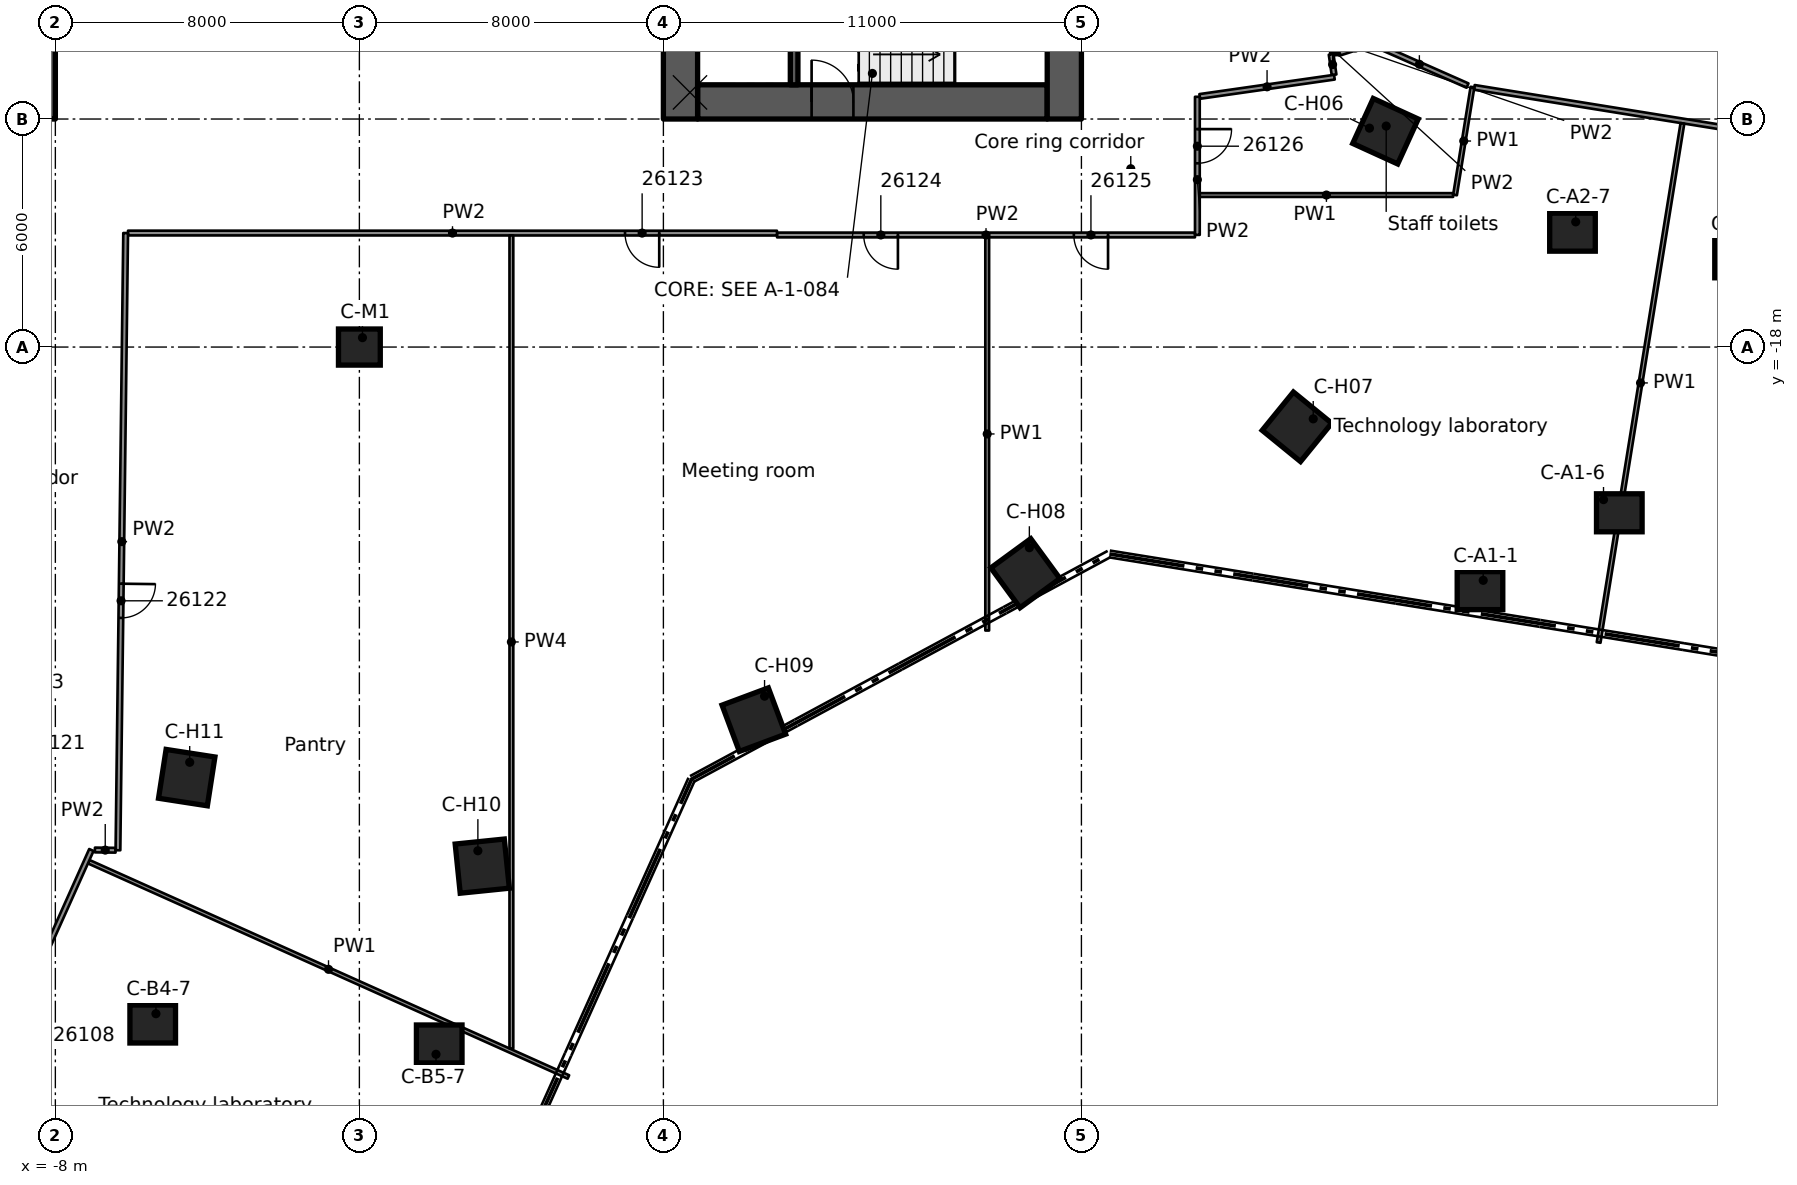
"""IFC4 building model, lengths in metres.
Left out: names, types, materials, properties, quantities, classifications, styles, units other than length and angle.
Written with IfcOpenShell. Run it as: python <this file> out.ifc"""

import sys

from ifc_helpers import new_model, si_unit, direction, frame, frame_2d, origin, origin_2d, place, context, subcontext, project, spatial, rectangle, extrude, element, fill, save


model = new_model("IFC4")
c1 = context("Model", 3, precision=1e-05, world=origin(), true_north=direction((0.0, 1.0)))
c2 = subcontext(c1, "Body", "Model", "MODEL_VIEW")
j1 = project(units=[si_unit("LENGTHUNIT", "METRE"), si_unit("PLANEANGLEUNIT", "RADIAN")], contexts=[c1])
p1 = place(None, origin())
s1 = spatial("IfcSite", under=j1, at=p1, CompositionType="ELEMENT")
p2 = place(p1, origin())
s2 = spatial("IfcBuilding", under=s1, at=p2, CompositionType="ELEMENT")
p3 = place(p2, frame((0.0, 0.0, 134.2)))
s3 = spatial("IfcBuildingStorey", under=s2, at=p3, CompositionType="ELEMENT", Elevation=134.2)
p4 = place(p3, frame((-8.45, -12.0, 0.0), z_axis=(0.0, 0.0, 1.0), x_axis=(0.0, 1.0, 0.0)))
e1 = element("IfcWall", 1, at=p4, inside=s3, PredefinedType="SHEAR", context=c2, shape_type="SweptSolid", body=[
    extrude(rectangle(XDim=24.0, YDim=0.9, at=frame_2d((12.0, 0.0))), origin(), (0.0, 0.0, 1.0), 3.5),
])
p5 = place(p4, frame((9.6, 0.0, 0.0)))
e2 = element("IfcOpeningElement", 2, at=p5, cuts=e1, PredefinedType="OPENING", context=c2, shape_type="SweptSolid", body=[
    extrude(rectangle(XDim=1.8, YDim=2.1, at=frame_2d((0.9, 1.05))), frame((0.0, 0.46, 0.0), z_axis=(0.0, -1.0, 0.0), x_axis=(1.0, 0.0, 0.0)), (0.0, 0.0, 1.0), 0.92),
])
p6 = place(p4, frame((19.65, 0.0, 0.0)))
e3 = element("IfcOpeningElement", 3, at=p6, cuts=e1, PredefinedType="OPENING", context=c2, shape_type="SweptSolid", body=[
    extrude(rectangle(XDim=1.1, YDim=2.1, at=frame_2d((0.55, 1.05))), frame((0.0, 0.46, 0.0), z_axis=(0.0, -1.0, 0.0), x_axis=(1.0, 0.0, 0.0)), (0.0, 0.0, 1.0), 0.92),
])
p7 = place(p3, frame((8.9, -11.55, 0.0), z_axis=(0.0, 0.0, 1.0), x_axis=(1.0, 0.0, 0.0)))
e4 = element("IfcWall", 4, at=p7, inside=s3, PredefinedType="SHEAR", context=c2, shape_type="SweptSolid", body=[
    extrude(rectangle(XDim=9.2, YDim=0.9, at=frame_2d((4.6, 0.0))), origin(), (0.0, 0.0, 1.0), 3.5),
])
p8 = place(p7, frame((3.0, 0.0, 0.0)))
e5 = element("IfcOpeningElement", 5, at=p8, cuts=e4, PredefinedType="OPENING", context=c2, shape_type="SweptSolid", body=[
    extrude(rectangle(XDim=1.1, YDim=2.1, at=frame_2d((0.55, 1.05))), frame((0.0, 0.46, 0.0), z_axis=(0.0, -1.0, 0.0), x_axis=(1.0, 0.0, 0.0)), (0.0, 0.0, 1.0), 0.92),
])
p9 = place(p3, frame((8.45, -12.0, 0.0), z_axis=(0.0, 0.0, 1.0), x_axis=(0.0, 1.0, 0.0)))
e6 = element("IfcWall", 6, at=p9, inside=s3, PredefinedType="SHEAR", context=c2, shape_type="SweptSolid", body=[
    extrude(rectangle(XDim=24.0, YDim=0.9, at=frame_2d((12.0, 0.0))), origin(), (0.0, 0.0, 1.0), 3.5),
])
p10 = place(p9, frame((12.6, 0.0, 0.0)))
e7 = element("IfcOpeningElement", 7, at=p10, cuts=e6, PredefinedType="OPENING", context=c2, shape_type="SweptSolid", body=[
    extrude(rectangle(XDim=1.8, YDim=2.1, at=frame_2d((0.9, 1.05))), frame((0.0, 0.46, 0.0), z_axis=(0.0, -1.0, 0.0), x_axis=(1.0, 0.0, 0.0)), (0.0, 0.0, 1.0), 0.92),
])
p11 = place(p9, frame((3.25, 0.0, 0.0)))
e8 = element("IfcOpeningElement", 8, at=p11, cuts=e6, PredefinedType="OPENING", context=c2, shape_type="SweptSolid", body=[
    extrude(rectangle(XDim=1.1, YDim=2.1, at=frame_2d((0.55, 1.05))), frame((0.0, 0.46, 0.0), z_axis=(0.0, -1.0, 0.0), x_axis=(1.0, 0.0, 0.0)), (0.0, 0.0, 1.0), 0.92),
])
p12 = place(p3, frame((18.55, -12.0, 0.0), z_axis=(0.0, 0.0, 1.0), x_axis=(0.0, 1.0, 0.0)))
e9 = element("IfcWall", 9, at=p12, inside=s3, PredefinedType="SHEAR", context=c2, shape_type="SweptSolid", body=[
    extrude(rectangle(XDim=24.0, YDim=0.9, at=frame_2d((12.0, 0.0))), origin(), (0.0, 0.0, 1.0), 3.5),
])
p13 = place(p12, frame((12.1, 0.0, 0.0)))
e10 = element("IfcOpeningElement", 10, at=p13, cuts=e9, PredefinedType="OPENING", context=c2, shape_type="SweptSolid", body=[
    extrude(rectangle(XDim=1.8, YDim=2.1, at=frame_2d((0.9, 1.05))), frame((0.0, 0.46, 0.0), z_axis=(0.0, -1.0, 0.0), x_axis=(1.0, 0.0, 0.0)), (0.0, 0.0, 1.0), 0.92),
])
for number, where, z_axis, x_axis in (
    (11, (29.488, -24.409, 0.0), (0.0, 0.0, 1.0), (1.0, 0.0, 0.0)),
    (12, (33.154, -22.361, 0.0), (0.0, 0.0, 1.0), (1.0, 0.0, 0.0)),
    (13, (36.266, -15.678, 0.0), (0.0, 0.0, 1.0), (1.0, 0.0, 0.0)),
    (14, (31.922, -14.977, 0.0), (0.0, 0.0, 1.0), (1.0, 0.0, 0.0)),
    (15, (-5.438, -35.812, 0.0), (0.0, 0.0, 1.0), (1.0, 0.0, 0.0)),
    (16, (2.101, -36.338, 0.0), (0.0, 0.0, 1.0), (1.0, 0.0, 0.0)),
):
    element("IfcColumn", number, at=place(p3, frame(where, z_axis=z_axis, x_axis=x_axis)), inside=s3, PredefinedType="COLUMN", context=c2, shape_type="SweptSolid", body=[
        extrude(rectangle(XDim=1.2, YDim=1.0, at=origin_2d()), origin(), (0.0, 0.0, 1.0), 3.5),
    ])
for number, where, z_axis, x_axis in (
    (17, (27.001, -12.321, 0.0), (0.0, 0.0, 1.0), (0.91, -0.415, 0.0)),
    (18, (24.672, -20.098, 0.0), (0.0, 0.0, 1.0), (0.775, -0.632, 0.0)),
    (19, (17.526, -23.951, 0.0), (0.0, 0.0, 1.0), (0.591, -0.807, 0.0)),
    (20, (10.38, -27.804, 0.0), (0.0, 0.0, 1.0), (0.35, -0.937, 0.0)),
    (21, (3.234, -31.658, 0.0), (0.0, 0.0, 1.0), (0.102, -0.995, 0.0)),
    (22, (-4.543, -29.329, 0.0), (0.0, 0.0, 1.0), (-0.153, -0.988, 0.0)),
):
    element("IfcColumn", number, at=place(p3, frame(where, z_axis=z_axis, x_axis=x_axis)), inside=s3, PredefinedType="COLUMN", context=c2, shape_type="SweptSolid", body=[
        extrude(rectangle(XDim=1.3, YDim=1.3, at=origin_2d()), origin(), (0.0, 0.0, 1.0), 3.5),
    ])
p14 = place(p3, frame((0.0, -18.0, 0.0), z_axis=(0.0, 0.0, 1.0), x_axis=(1.0, 0.0, 0.0)))
e23 = element("IfcColumn", 23, at=p14, inside=s3, PredefinedType="COLUMN", context=c2, shape_type="SweptSolid", body=[
    extrude(rectangle(XDim=1.1, YDim=0.95, at=origin_2d()), origin(), (0.0, 0.0, 1.0), 3.5),
])
p15 = place(p3, frame((11.44, -6.975, 0.0), z_axis=(0.0, 0.0, 1.0), x_axis=(0.0, -1.0, 0.0)))
e24 = element("IfcWall", 24, at=p15, inside=s3, PredefinedType="SOLIDWALL", context=c2, shape_type="SweptSolid", body=[
    extrude(rectangle(XDim=4.125, YDim=0.2, at=frame_2d((2.062, 0.0))), origin(), (0.0, 0.0, 1.0), 3.09),
])
p16 = place(p15, frame((2.1, 0.0, 0.0)))
e25 = element("IfcOpeningElement", 25, at=p16, cuts=e24, PredefinedType="OPENING", context=c2, shape_type="SweptSolid", body=[
    extrude(rectangle(XDim=1.1, YDim=2.1, at=frame_2d((0.55, 1.05))), frame((0.0, 0.11, 0.0), z_axis=(0.0, -1.0, 0.0), x_axis=(1.0, 0.0, 0.0)), (0.0, 0.0, 1.0), 0.22),
])
p17 = place(p3, frame((25.571, -10.299, 0.0), z_axis=(0.0, 0.0, 1.0), x_axis=(0.141799477861, -0.989895402595, 0.0)))
e26 = element("IfcWall", 26, at=p17, inside=s3, PredefinedType="PARTITIONING", context=c2, shape_type="SweptSolid", body=[
    extrude(rectangle(XDim=0.542, YDim=0.125, at=frame_2d((0.271, 0.0))), origin(), (0.0, 0.0, 1.0), 3.03),
])
p18 = place(p3, frame((26.626, -9.999, 0.0), z_axis=(0.0, 0.0, 1.0), x_axis=(0.914493335472, -0.404600963145, 0.0)))
e27 = element("IfcWall", 27, at=p18, inside=s3, PredefinedType="PARTITIONING", context=c2, shape_type="SweptSolid", body=[
    extrude(rectangle(XDim=2.771, YDim=0.125, at=frame_2d((1.385, 0.0))), origin(), (0.0, 0.0, 1.0), 3.03),
])
p19 = place(p3, frame((-7.124, -31.541, 0.0), z_axis=(0.0, 0.0, 1.0), x_axis=(0.91234755526, -0.409416582971, 0.0)))
e28 = element("IfcWall", 28, at=p19, inside=s3, PredefinedType="PARTITIONING", context=c2, shape_type="SweptSolid", body=[
    extrude(rectangle(XDim=13.837, YDim=0.1, at=frame_2d((6.918, 0.0))), origin(), (0.0, 0.0, 1.0), 3.03),
])
p20 = place(p3, frame((25.558, -10.206, 0.0), z_axis=(0.0, 0.0, 1.0), x_axis=(0.968355193071, -0.249576080688, 0.0)))
e29 = element("IfcWall", 29, at=p20, inside=s3, PredefinedType="PARTITIONING", context=c2, shape_type="SweptSolid", body=[
    extrude(rectangle(XDim=0.245, YDim=0.125, at=frame_2d((0.122, 0.0))), origin(), (0.0, 0.0, 1.0), 3.03),
])
p21 = place(p3, frame((53.72, -15.097, 0.0), z_axis=(0.0, 0.0, 1.0), x_axis=(-0.987256807208, 0.159135152063, 0.0)))
e30 = element("IfcWall", 30, at=p21, inside=s3, PredefinedType="PARTITIONING", context=c2, shape_type="SweptSolid", body=[
    extrude(rectangle(XDim=24.696, YDim=0.125, at=frame_2d((12.348, 0.0))), origin(), (0.0, 0.0, 1.0), 3.03),
])
p22 = place(p21, frame((1.039, 0.0, 0.0)))
e31 = element("IfcOpeningElement", 31, at=p22, cuts=e30, PredefinedType="OPENING", context=c2, shape_type="SweptSolid", body=[
    extrude(rectangle(XDim=0.9, YDim=2.1, at=frame_2d((0.45, 1.05))), frame((0.0, 0.073, 0.0), z_axis=(0.0, -1.0, 0.0), x_axis=(1.0, 0.0, 0.0)), (0.0, 0.0, 1.0), 0.145),
])
p23 = place(p21, frame((11.739, 0.0, 0.0)))
e32 = element("IfcOpeningElement", 32, at=p23, cuts=e30, PredefinedType="OPENING", context=c2, shape_type="SweptSolid", body=[
    extrude(rectangle(XDim=0.9, YDim=2.1, at=frame_2d((0.45, 1.05))), frame((0.0, 0.073, 0.0), z_axis=(0.0, -1.0, 0.0), x_axis=(1.0, 0.0, 0.0)), (0.0, 0.0, 1.0), 0.145),
])
p24 = place(p3, frame((29.885, -8.215, 0.0), z_axis=(0.0, 0.0, 1.0), x_axis=(0.987236652076, -0.1592601419, 0.0)))
e33 = element("IfcWall", 33, at=p24, inside=s3, PredefinedType="PARTITIONING", context=c2, shape_type="SweptSolid", body=[
    extrude(rectangle(XDim=21.612, YDim=0.15, at=frame_2d((10.806, 0.0))), origin(), (0.0, 0.0, 1.0), 3.03),
])
p25 = place(p24, frame((2.3, 0.0, 0.0)))
e34 = element("IfcOpeningElement", 34, at=p25, cuts=e33, PredefinedType="OPENING", context=c2, shape_type="SweptSolid", body=[
    extrude(rectangle(XDim=0.9, YDim=2.1, at=frame_2d((0.45, 1.05))), frame((0.0, 0.085, 0.0), z_axis=(0.0, -1.0, 0.0), x_axis=(1.0, 0.0, 0.0)), (0.0, 0.0, 1.0), 0.17),
])
p26 = place(p24, frame((12.088, 0.0, 0.0)))
e35 = element("IfcOpeningElement", 35, at=p26, cuts=e33, PredefinedType="OPENING", context=c2, shape_type="SweptSolid", body=[
    extrude(rectangle(XDim=0.9, YDim=2.1, at=frame_2d((0.45, 1.05))), frame((0.0, 0.085, 0.0), z_axis=(0.0, -1.0, 0.0), x_axis=(1.0, 0.0, 0.0)), (0.0, 0.0, 1.0), 0.17),
])
p27 = place(p3, frame((-6.959, -31.233, 0.0), z_axis=(0.0, 0.0, 1.0), x_axis=(0.999914995669, -0.013038459926, 0.0)))
e36 = element("IfcWall", 36, at=p27, inside=s3, PredefinedType="PARTITIONING", context=c2, shape_type="SweptSolid", body=[
    extrude(rectangle(XDim=0.543, YDim=0.125, at=frame_2d((0.271, 0.0))), origin(), (0.0, 0.0, 1.0), 3.03),
])
p28 = place(p3, frame((21.988, -15.051, 0.0), z_axis=(0.0, 0.0, 1.0), x_axis=(-1.0, 0.0, 0.0)))
e37 = element("IfcWall", 37, at=p28, inside=s3, PredefinedType="PARTITIONING", context=c2, shape_type="SweptSolid", body=[
    extrude(rectangle(XDim=10.997, YDim=0.125, at=frame_2d((5.499, 0.0))), origin(), (0.0, 0.0, 1.0), 3.03),
])
p29 = place(p28, frame((7.816, 0.0, 0.0)))
e38 = element("IfcOpeningElement", 38, at=p29, cuts=e37, PredefinedType="OPENING", context=c2, shape_type="SweptSolid", body=[
    extrude(rectangle(XDim=0.9, YDim=2.1, at=frame_2d((0.45, 1.05))), frame((0.0, 0.073, 0.0), z_axis=(0.0, -1.0, 0.0), x_axis=(1.0, 0.0, 0.0)), (0.0, 0.0, 1.0), 0.145),
])
p30 = place(p28, frame((2.288, 0.0, 0.0)))
e39 = element("IfcOpeningElement", 39, at=p30, cuts=e37, PredefinedType="OPENING", context=c2, shape_type="SweptSolid", body=[
    extrude(rectangle(XDim=0.9, YDim=2.1, at=frame_2d((0.45, 1.05))), frame((0.0, 0.073, 0.0), z_axis=(0.0, -1.0, 0.0), x_axis=(1.0, 0.0, 0.0)), (0.0, 0.0, 1.0), 0.145),
])
p31 = place(p3, frame((10.989, -15.002, 0.0), z_axis=(0.0, 0.0, 1.0), x_axis=(-0.999999993459, 0.00011437231, 0.0)))
e40 = element("IfcWall", 40, at=p31, inside=s3, PredefinedType="PARTITIONING", context=c2, shape_type="SweptSolid", body=[
    extrude(rectangle(XDim=17.077, YDim=0.125, at=frame_2d((8.539, 0.0))), origin(), (0.0, 0.0, 1.0), 3.03),
])
p32 = place(p31, frame((3.098, 0.0, 0.0)))
e41 = element("IfcOpeningElement", 41, at=p32, cuts=e40, PredefinedType="OPENING", context=c2, shape_type="SweptSolid", body=[
    extrude(rectangle(XDim=0.9, YDim=2.1, at=frame_2d((0.45, 1.05))), frame((0.0, 0.073, 0.0), z_axis=(0.0, -1.0, 0.0), x_axis=(1.0, 0.0, 0.0)), (0.0, 0.0, 1.0), 0.145),
])
p33 = place(p3, frame((22.113, -14.0, 0.0), z_axis=(0.0, 0.0, 1.0), x_axis=(1.0, 0.0, 0.0)))
e42 = element("IfcWall", 42, at=p33, inside=s3, PredefinedType="PARTITIONING", context=c2, shape_type="SweptSolid", body=[
    extrude(rectangle(XDim=6.668, YDim=0.1, at=frame_2d((3.334, 0.0))), origin(), (0.0, 0.0, 1.0), 3.03),
])
p34 = place(p3, frame((25.657, -10.899, 0.0), z_axis=(0.0, 0.0, 1.0), x_axis=(-0.989918099623, -0.141640940543, 0.0)))
e43 = element("IfcWall", 43, at=p34, inside=s3, PredefinedType="PARTITIONING", context=c2, shape_type="SweptSolid", body=[
    extrude(rectangle(XDim=3.58, YDim=0.125, at=frame_2d((1.79, 0.0))), origin(), (0.0, 0.0, 1.0), 3.03),
])
p35 = place(p3, frame((25.796, -10.267, 0.0), z_axis=(0.0, 0.0, 1.0), x_axis=(0.951608325535, 0.307313512187, 0.0)))
e44 = element("IfcWall", 44, at=p35, inside=s3, PredefinedType="PARTITIONING", context=c2, shape_type="SweptSolid", body=[
    extrude(rectangle(XDim=0.872, YDim=0.125, at=frame_2d((0.436, 0.0))), origin(), (0.0, 0.0, 1.0), 3.03),
])
p36 = place(p3, frame((-7.052, -31.233, 0.0), z_axis=(0.0, 0.0, 1.0), x_axis=(-0.409475332718, -0.912321188998, 0.0)))
e45 = element("IfcWall", 45, at=p36, inside=s3, PredefinedType="PARTITIONING", context=c2, shape_type="SweptSolid", body=[
    extrude(rectangle(XDim=25.117, YDim=0.125, at=frame_2d((12.559, 0.0))), origin(), (0.0, 0.0, 1.0), 3.03),
])
p37 = place(p36, frame((4.91, 0.0, 0.0)))
e46 = element("IfcOpeningElement", 46, at=p37, cuts=e45, PredefinedType="OPENING", context=c2, shape_type="SweptSolid", body=[
    extrude(rectangle(XDim=0.9, YDim=2.1, at=frame_2d((0.45, 1.05))), frame((0.0, 0.073, 0.0), z_axis=(0.0, -1.0, 0.0), x_axis=(1.0, 0.0, 0.0)), (0.0, 0.0, 1.0), 0.145),
])
p38 = place(p36, frame((14.217, 0.0, 0.0)))
e47 = element("IfcOpeningElement", 47, at=p38, cuts=e45, PredefinedType="OPENING", context=c2, shape_type="SweptSolid", body=[
    extrude(rectangle(XDim=1.8, YDim=2.1, at=frame_2d((0.9, 1.05))), frame((0.0, 0.073, 0.0), z_axis=(0.0, -1.0, 0.0), x_axis=(1.0, 0.0, 0.0)), (0.0, 0.0, 1.0), 0.145),
])
p39 = place(p36, frame((21.867, 0.0, 0.0)))
e48 = element("IfcOpeningElement", 48, at=p39, cuts=e45, PredefinedType="OPENING", context=c2, shape_type="SweptSolid", body=[
    extrude(rectangle(XDim=0.9, YDim=2.1, at=frame_2d((0.45, 1.05))), frame((0.0, 0.073, 0.0), z_axis=(0.0, -1.0, 0.0), x_axis=(1.0, 0.0, 0.0)), (0.0, 0.0, 1.0), 0.145),
])
p40 = place(p3, frame((32.61, -25.774, 0.0), z_axis=(0.0, 0.0, 1.0), x_axis=(0.159346714874, 0.987222682306, 0.0)))
e49 = element("IfcWall", 49, at=p40, inside=s3, PredefinedType="PARTITIONING", context=c2, shape_type="SweptSolid", body=[
    extrude(rectangle(XDim=13.837, YDim=0.1, at=frame_2d((6.918, 0.0))), origin(), (0.0, 0.0, 1.0), 3.03),
])
p41 = place(p3, frame((28.831, -13.999, 0.0), z_axis=(0.0, 0.0, 1.0), x_axis=(0.15953925726, 0.987191584948, 0.0)))
e50 = element("IfcWall", 50, at=p41, inside=s3, PredefinedType="PARTITIONING", context=c2, shape_type="SweptSolid", body=[
    extrude(rectangle(XDim=2.877, YDim=0.1, at=frame_2d((1.438, 0.0))), origin(), (0.0, 0.0, 1.0), 3.03),
])
p42 = place(p3, frame((-6.15, -15.0, 0.0), z_axis=(0.0, 0.0, 1.0), x_axis=(-0.012506726311, -0.99992178784, 0.0)))
e51 = element("IfcWall", 51, at=p42, inside=s3, PredefinedType="PARTITIONING", context=c2, shape_type="SweptSolid", body=[
    extrude(rectangle(XDim=16.241, YDim=0.125, at=frame_2d((8.121, 0.0))), origin(), (0.0, 0.0, 1.0), 3.03),
])
p43 = place(p42, frame((9.227, 0.0, 0.0)))
e52 = element("IfcOpeningElement", 52, at=p43, cuts=e51, PredefinedType="OPENING", context=c2, shape_type="SweptSolid", body=[
    extrude(rectangle(XDim=0.9, YDim=2.1, at=frame_2d((0.45, 1.05))), frame((0.0, 0.073, 0.0), z_axis=(0.0, -1.0, 0.0), x_axis=(1.0, 0.0, 0.0)), (0.0, 0.0, 1.0), 0.145),
])
p44 = place(p3, frame((22.051, -11.415, 0.0), z_axis=(0.0, 0.0, 1.0), x_axis=(0.0, -1.0, 0.0)))
e53 = element("IfcWall", 53, at=p44, inside=s3, PredefinedType="PARTITIONING", context=c2, shape_type="SweptSolid", body=[
    extrude(rectangle(XDim=3.634, YDim=0.125, at=frame_2d((1.817, 0.0))), origin(), (0.0, 0.0, 1.0), 3.03),
])
p45 = place(p44, frame((0.85, 0.0, 0.0)))
e54 = element("IfcOpeningElement", 54, at=p45, cuts=e53, PredefinedType="OPENING", context=c2, shape_type="SweptSolid", body=[
    extrude(rectangle(XDim=0.9, YDim=2.1, at=frame_2d((0.45, 1.05))), frame((0.0, 0.073, 0.0), z_axis=(0.0, -1.0, 0.0), x_axis=(1.0, 0.0, 0.0)), (0.0, 0.0, 1.0), 0.145),
])
p46 = place(p3, frame((16.521, -25.459, 0.0), z_axis=(0.0, 0.0, 1.0), x_axis=(0.0, 1.0, 0.0)))
e55 = element("IfcWall", 55, at=p46, inside=s3, PredefinedType="PARTITIONING", context=c2, shape_type="SweptSolid", body=[
    extrude(rectangle(XDim=10.345, YDim=0.1, at=frame_2d((5.172, 0.0))), origin(), (0.0, 0.0, 1.0), 3.03),
])
p47 = place(p3, frame((4.0, -36.456, 0.0), z_axis=(0.0, 0.0, 1.0), x_axis=(0.0, 1.0, 0.0)))
e56 = element("IfcWall", 56, at=p47, inside=s3, PredefinedType="PARTITIONING", context=c2, shape_type="SweptSolid", body=[
    extrude(rectangle(XDim=21.393, YDim=0.1, at=frame_2d((10.697, 0.0))), origin(), (0.0, 0.0, 1.0), 2.395),
])
p48 = place(p8, origin())
e57 = element("IfcDoor", 57, at=p48, inside=s3, OperationType="SINGLE_SWING_LEFT", PredefinedType="DOOR", context=c2, shape_type="SweptSolid", body=[
    extrude(rectangle(XDim=1.1, YDim=2.1, at=frame_2d((0.55, 1.05))), frame((0.0, 0.025, 0.0), z_axis=(0.0, -1.0, 0.0), x_axis=(1.0, 0.0, 0.0)), (0.0, 0.0, 1.0), 0.05),
])
fill(e5, e57)
p49 = place(p43, origin())
e58 = element("IfcDoor", 58, at=p49, inside=s3, OperationType="SINGLE_SWING_RIGHT", PredefinedType="DOOR", context=c2, shape_type="SweptSolid", body=[
    extrude(rectangle(XDim=0.9, YDim=2.1, at=frame_2d((0.45, 1.05))), frame((0.0, 0.025, 0.0), z_axis=(0.0, -1.0, 0.0), x_axis=(1.0, 0.0, 0.0)), (0.0, 0.0, 1.0), 0.05),
])
fill(e52, e58)
p50 = place(p32, origin())
e59 = element("IfcDoor", 59, at=p50, inside=s3, OperationType="SINGLE_SWING_LEFT", PredefinedType="DOOR", context=c2, shape_type="SweptSolid", body=[
    extrude(rectangle(XDim=0.9, YDim=2.1, at=frame_2d((0.45, 1.05))), frame((0.0, 0.025, 0.0), z_axis=(0.0, -1.0, 0.0), x_axis=(1.0, 0.0, 0.0)), (0.0, 0.0, 1.0), 0.05),
])
fill(e41, e59)
p51 = place(p29, origin())
e60 = element("IfcDoor", 60, at=p51, inside=s3, OperationType="SINGLE_SWING_RIGHT", PredefinedType="DOOR", context=c2, shape_type="SweptSolid", body=[
    extrude(rectangle(XDim=0.9, YDim=2.1, at=frame_2d((0.45, 1.05))), frame((0.0, 0.025, 0.0), z_axis=(0.0, -1.0, 0.0), x_axis=(1.0, 0.0, 0.0)), (0.0, 0.0, 1.0), 0.05),
])
fill(e38, e60)
p52 = place(p30, origin())
e61 = element("IfcDoor", 61, at=p52, inside=s3, OperationType="SINGLE_SWING_LEFT", PredefinedType="DOOR", context=c2, shape_type="SweptSolid", body=[
    extrude(rectangle(XDim=0.9, YDim=2.1, at=frame_2d((0.45, 1.05))), frame((0.0, 0.025, 0.0), z_axis=(0.0, -1.0, 0.0), x_axis=(1.0, 0.0, 0.0)), (0.0, 0.0, 1.0), 0.05),
])
fill(e39, e61)
p53 = place(p45, origin())
e62 = element("IfcDoor", 62, at=p53, inside=s3, OperationType="SINGLE_SWING_LEFT", PredefinedType="DOOR", context=c2, shape_type="SweptSolid", body=[
    extrude(rectangle(XDim=0.9, YDim=2.1, at=frame_2d((0.45, 1.05))), frame((0.0, 0.025, 0.0), z_axis=(0.0, -1.0, 0.0), x_axis=(1.0, 0.0, 0.0)), (0.0, 0.0, 1.0), 0.05),
])
fill(e54, e62)
save(model, sys.argv[1])
